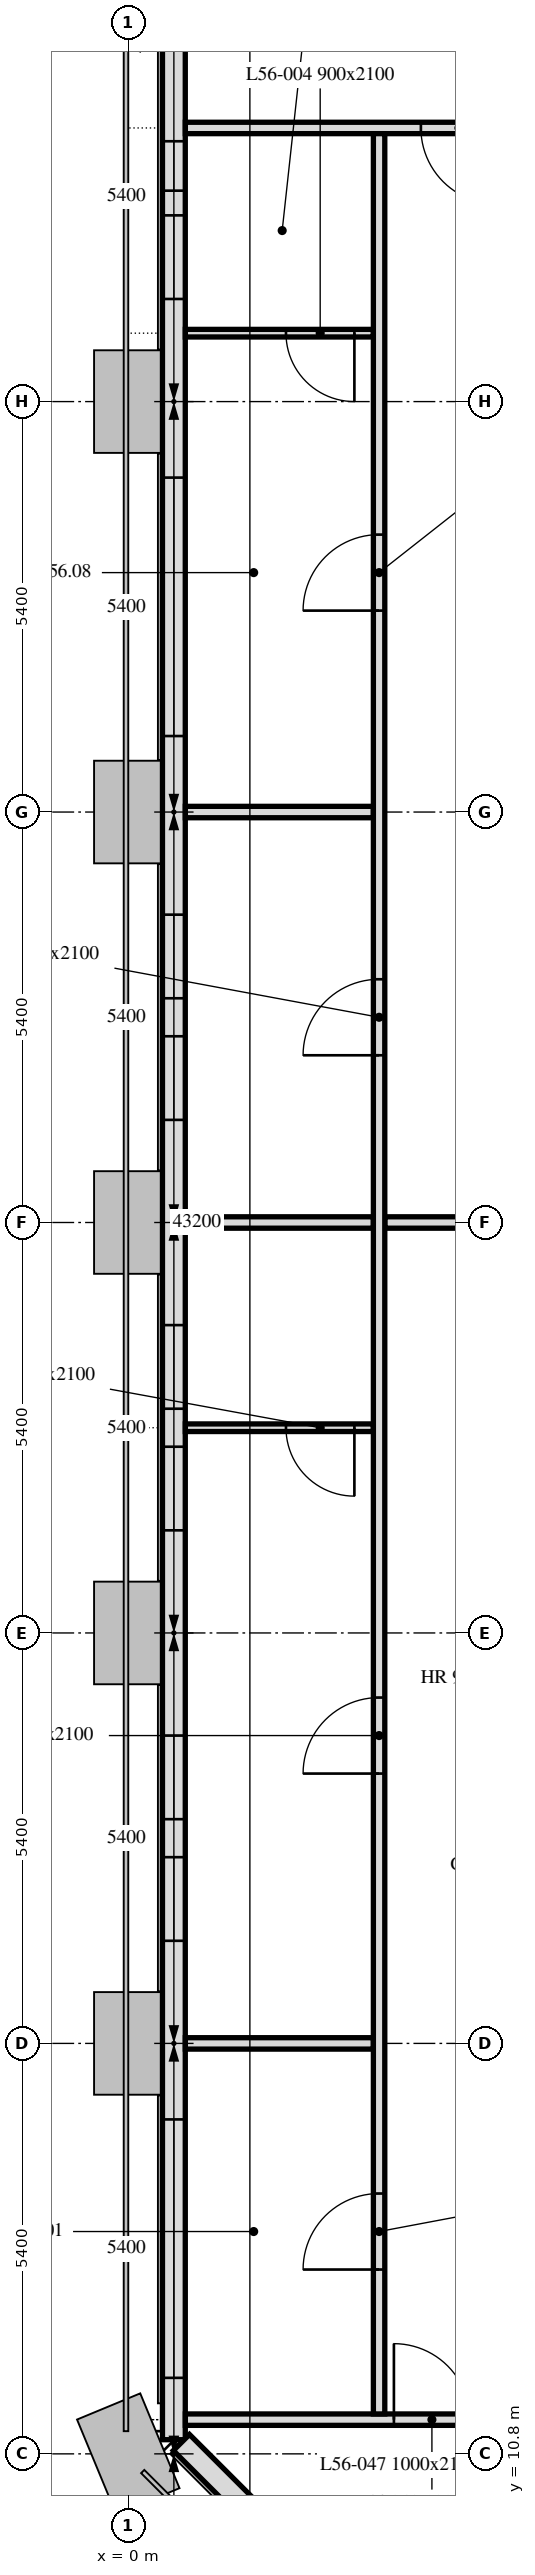
"""IFC4 building model, lengths in metres.
Left out: names, types, materials, properties, quantities, classifications, styles, units other than length and angle.
Written with IfcOpenShell. Run it as: python <this file> out.ifc"""

import sys

from ifc_helpers import new_model, si_unit, direction, frame, frame_2d, origin, place, context, subcontext, project, spatial, rectangle, extrude, element, fill, save


model = new_model("IFC4")
c1 = context("Model", 3, precision=1e-05, world=origin(), true_north=direction((0.0, 1.0)))
c2 = subcontext(c1, "Body", "Model", "MODEL_VIEW")
j1 = project(units=[si_unit("LENGTHUNIT", "METRE"), si_unit("PLANEANGLEUNIT", "RADIAN")], contexts=[c1])
p1 = place(None, origin())
s1 = spatial("IfcSite", under=j1, at=p1, CompositionType="ELEMENT")
p2 = place(p1, origin())
s2 = spatial("IfcBuilding", under=s1, at=p2, CompositionType="ELEMENT")
p3 = place(p2, frame((0.0, 0.0, 223.6)))
s3 = spatial("IfcBuildingStorey", under=s2, at=p3, CompositionType="ELEMENT", Elevation=223.6)
p4 = place(p3, frame((0.6, 43.014, 0.0), z_axis=(0.0, 0.0, 1.0), x_axis=(0.0, -1.0, 0.0)))
e1 = element("IfcWall", 1, at=p4, inside=s3, PredefinedType="SOLIDWALL", context=c2, shape_type="SweptSolid", body=[
    extrude(rectangle(XDim=32.027, YDim=0.3, at=frame_2d((16.014, 0.0))), origin(), (0.0, 0.0, 1.0), 3.0),
])
p5 = place(p4, frame((1.789, 0.0, 0.9)))
e2 = element("IfcOpeningElement", 2, at=p5, cuts=e1, PredefinedType="OPENING", context=c2, shape_type="SweptSolid", body=[
    extrude(rectangle(XDim=0.65, YDim=1.7, at=frame_2d((0.325, 0.85))), frame((0.0, 0.16, 0.0), z_axis=(0.0, -1.0, 0.0), x_axis=(1.0, 0.0, 0.0)), (0.0, 0.0, 1.0), 0.32),
])
p6 = place(p4, frame((2.764, 0.0, 0.9)))
e3 = element("IfcOpeningElement", 3, at=p6, cuts=e1, PredefinedType="OPENING", context=c2, shape_type="SweptSolid", body=[
    extrude(rectangle(XDim=1.1, YDim=1.7, at=frame_2d((0.55, 0.85))), frame((0.0, 0.16, 0.0), z_axis=(0.0, -1.0, 0.0), x_axis=(1.0, 0.0, 0.0)), (0.0, 0.0, 1.0), 0.32),
])
p7 = place(p4, frame((6.214, 0.0, 0.9)))
e4 = element("IfcOpeningElement", 4, at=p7, cuts=e1, PredefinedType="OPENING", context=c2, shape_type="SweptSolid", body=[
    extrude(rectangle(XDim=3.4, YDim=1.7, at=frame_2d((1.7, 0.85))), frame((0.0, 0.16, 0.0), z_axis=(0.0, -1.0, 0.0), x_axis=(1.0, 0.0, 0.0)), (0.0, 0.0, 1.0), 0.32),
])
p8 = place(p4, frame((11.964, 0.0, 0.9)))
e5 = element("IfcOpeningElement", 5, at=p8, cuts=e1, PredefinedType="OPENING", context=c2, shape_type="SweptSolid", body=[
    extrude(rectangle(XDim=1.1, YDim=1.7, at=frame_2d((0.55, 0.85))), frame((0.0, 0.16, 0.0), z_axis=(0.0, -1.0, 0.0), x_axis=(1.0, 0.0, 0.0)), (0.0, 0.0, 1.0), 0.32),
])
p9 = place(p4, frame((13.564, 0.0, 0.9)))
e6 = element("IfcOpeningElement", 6, at=p9, cuts=e1, PredefinedType="OPENING", context=c2, shape_type="SweptSolid", body=[
    extrude(rectangle(XDim=1.1, YDim=1.7, at=frame_2d((0.55, 0.85))), frame((0.0, 0.16, 0.0), z_axis=(0.0, -1.0, 0.0), x_axis=(1.0, 0.0, 0.0)), (0.0, 0.0, 1.0), 0.32),
])
p10 = place(p4, frame((17.364, 0.0, 0.9)))
e7 = element("IfcOpeningElement", 7, at=p10, cuts=e1, PredefinedType="OPENING", context=c2, shape_type="SweptSolid", body=[
    extrude(rectangle(XDim=1.1, YDim=1.7, at=frame_2d((0.55, 0.85))), frame((0.0, 0.16, 0.0), z_axis=(0.0, -1.0, 0.0), x_axis=(1.0, 0.0, 0.0)), (0.0, 0.0, 1.0), 0.32),
])
p11 = place(p4, frame((18.964, 0.0, 0.9)))
e8 = element("IfcOpeningElement", 8, at=p11, cuts=e1, PredefinedType="OPENING", context=c2, shape_type="SweptSolid", body=[
    extrude(rectangle(XDim=1.1, YDim=1.7, at=frame_2d((0.55, 0.85))), frame((0.0, 0.16, 0.0), z_axis=(0.0, -1.0, 0.0), x_axis=(1.0, 0.0, 0.0)), (0.0, 0.0, 1.0), 0.32),
])
p12 = place(p4, frame((22.764, 0.0, 0.9)))
e9 = element("IfcOpeningElement", 9, at=p12, cuts=e1, PredefinedType="OPENING", context=c2, shape_type="SweptSolid", body=[
    extrude(rectangle(XDim=1.1, YDim=1.7, at=frame_2d((0.55, 0.85))), frame((0.0, 0.16, 0.0), z_axis=(0.0, -1.0, 0.0), x_axis=(1.0, 0.0, 0.0)), (0.0, 0.0, 1.0), 0.32),
])
p13 = place(p4, frame((24.364, 0.0, 0.9)))
e10 = element("IfcOpeningElement", 10, at=p13, cuts=e1, PredefinedType="OPENING", context=c2, shape_type="SweptSolid", body=[
    extrude(rectangle(XDim=1.1, YDim=1.7, at=frame_2d((0.55, 0.85))), frame((0.0, 0.16, 0.0), z_axis=(0.0, -1.0, 0.0), x_axis=(1.0, 0.0, 0.0)), (0.0, 0.0, 1.0), 0.32),
])
p14 = place(p4, frame((27.814, 0.0, 0.9)))
e11 = element("IfcOpeningElement", 11, at=p14, cuts=e1, PredefinedType="OPENING", context=c2, shape_type="SweptSolid", body=[
    extrude(rectangle(XDim=3.4, YDim=1.7, at=frame_2d((1.7, 0.85))), frame((0.0, 0.16, 0.0), z_axis=(0.0, -1.0, 0.0), x_axis=(1.0, 0.0, 0.0)), (0.0, 0.0, 1.0), 0.32),
])
p15 = place(p3, frame((0.699, 10.949, 0.0), z_axis=(0.0, 0.0, 1.0), x_axis=(0.707106781187, -0.707106781187, 0.0)))
e12 = element("IfcWall", 12, at=p15, inside=s3, PredefinedType="SOLIDWALL", context=c2, shape_type="SweptSolid", body=[
    extrude(rectangle(XDim=6.86, YDim=0.3, at=frame_2d((3.43, 0.0))), origin(), (0.0, 0.0, 1.0), 3.0),
])
p16 = place(p15, frame((1.28, 0.0, 0.9)))
e13 = element("IfcOpeningElement", 13, at=p16, cuts=e12, PredefinedType="OPENING", context=c2, shape_type="SweptSolid", body=[
    extrude(rectangle(XDim=1.1, YDim=1.7, at=frame_2d((0.55, 0.85))), frame((0.0, 0.16, 0.0), z_axis=(0.0, -1.0, 0.0), x_axis=(1.0, 0.0, 0.0)), (0.0, 0.0, 1.0), 0.32),
])
p17 = place(p15, frame((4.48, 0.0, 0.9)))
e14 = element("IfcOpeningElement", 14, at=p17, cuts=e12, PredefinedType="OPENING", context=c2, shape_type="SweptSolid", body=[
    extrude(rectangle(XDim=1.1, YDim=1.7, at=frame_2d((0.55, 0.85))), frame((0.0, 0.16, 0.0), z_axis=(0.0, -1.0, 0.0), x_axis=(1.0, 0.0, 0.0)), (0.0, 0.0, 1.0), 0.32),
])
p18 = place(p3, frame((0.751, 32.4, 0.0), z_axis=(0.0, 0.0, 1.0), x_axis=(1.0, 0.0, 0.0)))
e15 = element("IfcWall", 15, at=p18, inside=s3, PredefinedType="PARTITIONING", context=c2, shape_type="SweptSolid", body=[
    extrude(rectangle(XDim=2.474, YDim=0.15, at=frame_2d((1.237, 0.0))), origin(), (0.0, 0.0, 1.0), 2.4),
])
p19 = place(p3, frame((3.225, 38.7, 0.0), z_axis=(0.0, 0.0, 1.0), x_axis=(-1.0, 0.0, 0.0)))
e16 = element("IfcWall", 16, at=p19, inside=s3, PredefinedType="PARTITIONING", context=c2, shape_type="SweptSolid", body=[
    extrude(rectangle(XDim=2.474, YDim=0.1, at=frame_2d((1.237, 0.0))), origin(), (0.0, 0.0, 1.0), 3.0),
])
p20 = place(p19, frame((0.25, 0.0, 0.0)))
e17 = element("IfcOpeningElement", 17, at=p20, cuts=e16, PredefinedType="OPENING", context=c2, shape_type="SweptSolid", body=[
    extrude(rectangle(XDim=0.9, YDim=2.1, at=frame_2d((0.45, 1.05))), frame((0.0, 0.05, 0.0), z_axis=(0.0, -1.0, 0.0), x_axis=(1.0, 0.0, 0.0)), (0.0, 0.0, 1.0), 0.1),
])
p21 = place(p3, frame((42.449, 41.4, 0.0), z_axis=(0.0, 0.0, 1.0), x_axis=(-1.0, 0.0, 0.0)))
e18 = element("IfcWall", 18, at=p21, inside=s3, PredefinedType="PARTITIONING", context=c2, shape_type="SweptSolid", body=[
    extrude(rectangle(XDim=41.698, YDim=0.15, at=frame_2d((20.849, 0.0))), origin(), (0.0, 0.0, 1.0), 2.4),
])
p22 = place(p21, frame((1.449, 0.0, 0.0)))
e19 = element("IfcOpeningElement", 19, at=p22, cuts=e18, PredefinedType="OPENING", context=c2, shape_type="SweptSolid", body=[
    extrude(rectangle(XDim=1.0, YDim=2.1, at=frame_2d((0.5, 1.05))), frame((0.0, 0.075, 0.0), z_axis=(0.0, -1.0, 0.0), x_axis=(1.0, 0.0, 0.0)), (0.0, 0.0, 1.0), 0.15),
])
p23 = place(p21, frame((29.249, 0.0, 0.0)))
e20 = element("IfcOpeningElement", 20, at=p23, cuts=e18, PredefinedType="OPENING", context=c2, shape_type="SweptSolid", body=[
    extrude(rectangle(XDim=1.0, YDim=2.1, at=frame_2d((0.5, 1.05))), frame((0.0, 0.075, 0.0), z_axis=(0.0, -1.0, 0.0), x_axis=(1.0, 0.0, 0.0)), (0.0, 0.0, 1.0), 0.15),
])
p24 = place(p21, frame((37.599, 0.0, 0.0)))
e21 = element("IfcOpeningElement", 21, at=p24, cuts=e18, PredefinedType="OPENING", context=c2, shape_type="SweptSolid", body=[
    extrude(rectangle(XDim=1.0, YDim=2.1, at=frame_2d((0.5, 1.05))), frame((0.0, 0.075, 0.0), z_axis=(0.0, -1.0, 0.0), x_axis=(1.0, 0.0, 0.0)), (0.0, 0.0, 1.0), 0.15),
])
p25 = place(p21, frame((17.649, 0.0, 0.0)))
e22 = element("IfcOpeningElement", 22, at=p25, cuts=e18, PredefinedType="OPENING", context=c2, shape_type="SweptSolid", body=[
    extrude(rectangle(XDim=1.0, YDim=2.1, at=frame_2d((0.5, 1.05))), frame((0.0, 0.075, 0.0), z_axis=(0.0, -1.0, 0.0), x_axis=(1.0, 0.0, 0.0)), (0.0, 0.0, 1.0), 0.15),
])
p26 = place(p3, frame((0.751, 27.0, 0.0), z_axis=(0.0, 0.0, 1.0), x_axis=(1.0, 0.0, 0.0)))
e23 = element("IfcWall", 23, at=p26, inside=s3, PredefinedType="PARTITIONING", context=c2, shape_type="SweptSolid", body=[
    extrude(rectangle(XDim=2.474, YDim=0.15, at=frame_2d((1.237, 0.0))), origin(), (0.0, 0.0, 1.0), 2.4),
])
p27 = place(p3, frame((3.375, 27.0, 0.0), z_axis=(0.0, 0.0, 1.0), x_axis=(1.0, 0.0, 0.0)))
e24 = element("IfcWall", 24, at=p27, inside=s3, PredefinedType="PARTITIONING", context=c2, shape_type="SweptSolid", body=[
    extrude(rectangle(XDim=2.025, YDim=0.15, at=frame_2d((1.012, 0.0))), origin(), (0.0, 0.0, 1.0), 2.4),
])
p28 = place(p3, frame((3.225, 16.2, 0.0), z_axis=(0.0, 0.0, 1.0), x_axis=(-1.0, 0.0, 0.0)))
e25 = element("IfcWall", 25, at=p28, inside=s3, PredefinedType="PARTITIONING", context=c2, shape_type="SweptSolid", body=[
    extrude(rectangle(XDim=2.474, YDim=0.15, at=frame_2d((1.237, 0.0))), origin(), (0.0, 0.0, 1.0), 2.4),
])
p29 = place(p3, frame((0.751, 11.25, 0.0), z_axis=(0.0, 0.0, 1.0), x_axis=(1.0, 0.0, 0.0)))
e26 = element("IfcWall", 26, at=p29, inside=s3, PredefinedType="PARTITIONING", context=c2, shape_type="SweptSolid", body=[
    extrude(rectangle(XDim=41.698, YDim=0.15, at=frame_2d((20.849, 0.0))), origin(), (0.0, 0.0, 1.0), 3.0),
])
p30 = place(p29, frame((39.249, 0.0, 0.0)))
e27 = element("IfcOpeningElement", 27, at=p30, cuts=e26, PredefinedType="OPENING", context=c2, shape_type="SweptSolid", body=[
    extrude(rectangle(XDim=1.0, YDim=2.1, at=frame_2d((0.5, 1.05))), frame((0.0, 0.075, 0.0), z_axis=(0.0, -1.0, 0.0), x_axis=(1.0, 0.0, 0.0)), (0.0, 0.0, 1.0), 0.15),
])
p31 = place(p29, frame((27.649, 0.0, 0.0)))
e28 = element("IfcOpeningElement", 28, at=p31, cuts=e26, PredefinedType="OPENING", context=c2, shape_type="SweptSolid", body=[
    extrude(rectangle(XDim=1.0, YDim=2.1, at=frame_2d((0.5, 1.05))), frame((0.0, 0.075, 0.0), z_axis=(0.0, -1.0, 0.0), x_axis=(1.0, 0.0, 0.0)), (0.0, 0.0, 1.0), 0.15),
])
p32 = place(p29, frame((23.049, 0.0, 0.0)))
e29 = element("IfcOpeningElement", 29, at=p32, cuts=e26, PredefinedType="OPENING", context=c2, shape_type="SweptSolid", body=[
    extrude(rectangle(XDim=1.0, YDim=2.1, at=frame_2d((0.5, 1.05))), frame((0.0, 0.075, 0.0), z_axis=(0.0, -1.0, 0.0), x_axis=(1.0, 0.0, 0.0)), (0.0, 0.0, 1.0), 0.15),
])
p33 = place(p29, frame((11.449, 0.0, 0.0)))
e30 = element("IfcOpeningElement", 30, at=p33, cuts=e26, PredefinedType="OPENING", context=c2, shape_type="SweptSolid", body=[
    extrude(rectangle(XDim=1.0, YDim=2.1, at=frame_2d((0.5, 1.05))), frame((0.0, 0.075, 0.0), z_axis=(0.0, -1.0, 0.0), x_axis=(1.0, 0.0, 0.0)), (0.0, 0.0, 1.0), 0.15),
])
p34 = place(p29, frame((2.744, 0.0, 0.0)))
e31 = element("IfcOpeningElement", 31, at=p34, cuts=e26, PredefinedType="OPENING", context=c2, shape_type="SweptSolid", body=[
    extrude(rectangle(XDim=1.0, YDim=2.1, at=frame_2d((0.5, 1.05))), frame((0.0, 0.075, 0.0), z_axis=(0.0, -1.0, 0.0), x_axis=(1.0, 0.0, 0.0)), (0.0, 0.0, 1.0), 0.15),
])
p35 = place(p3, frame((3.225, 24.3, 0.0), z_axis=(0.0, 0.0, 1.0), x_axis=(-1.0, 0.0, 0.0)))
e32 = element("IfcWall", 32, at=p35, inside=s3, PredefinedType="PARTITIONING", context=c2, shape_type="SweptSolid", body=[
    extrude(rectangle(XDim=2.474, YDim=0.1, at=frame_2d((1.237, 0.0))), origin(), (0.0, 0.0, 1.0), 3.0),
])
p36 = place(p35, frame((0.25, 0.0, 0.0)))
e33 = element("IfcOpeningElement", 33, at=p36, cuts=e32, PredefinedType="OPENING", context=c2, shape_type="SweptSolid", body=[
    extrude(rectangle(XDim=0.9, YDim=2.1, at=frame_2d((0.45, 1.05))), frame((0.0, 0.05, 0.0), z_axis=(0.0, -1.0, 0.0), x_axis=(1.0, 0.0, 0.0)), (0.0, 0.0, 1.0), 0.1),
])
p37 = place(p3, frame((3.3, 11.325, 0.0), z_axis=(0.0, 0.0, 1.0), x_axis=(0.0, 1.0, 0.0)))
e34 = element("IfcWall", 34, at=p37, inside=s3, PredefinedType="PARTITIONING", context=c2, shape_type="SweptSolid", body=[
    extrude(rectangle(XDim=30.0, YDim=0.15, at=frame_2d((15.0, 0.0))), origin(), (0.0, 0.0, 1.0), 2.4),
])
p38 = place(p37, frame((17.875, 0.0, 0.0)))
e35 = element("IfcOpeningElement", 35, at=p38, cuts=e34, PredefinedType="OPENING", context=c2, shape_type="SweptSolid", body=[
    extrude(rectangle(XDim=1.0, YDim=2.1, at=frame_2d((0.5, 1.05))), frame((0.0, 0.075, 0.0), z_axis=(0.0, -1.0, 0.0), x_axis=(1.0, 0.0, 0.0)), (0.0, 0.0, 1.0), 0.15),
])
p39 = place(p37, frame((1.9, 0.0, 0.0)))
e36 = element("IfcOpeningElement", 36, at=p39, cuts=e34, PredefinedType="OPENING", context=c2, shape_type="SweptSolid", body=[
    extrude(rectangle(XDim=1.0, YDim=2.1, at=frame_2d((0.5, 1.05))), frame((0.0, 0.075, 0.0), z_axis=(0.0, -1.0, 0.0), x_axis=(1.0, 0.0, 0.0)), (0.0, 0.0, 1.0), 0.15),
])
p40 = place(p37, frame((23.725, 0.0, 0.0)))
e37 = element("IfcOpeningElement", 37, at=p40, cuts=e34, PredefinedType="OPENING", context=c2, shape_type="SweptSolid", body=[
    extrude(rectangle(XDim=1.0, YDim=2.1, at=frame_2d((0.5, 1.05))), frame((0.0, 0.075, 0.0), z_axis=(0.0, -1.0, 0.0), x_axis=(1.0, 0.0, 0.0)), (0.0, 0.0, 1.0), 0.15),
])
p41 = place(p37, frame((8.425, 0.0, 0.0)))
e38 = element("IfcOpeningElement", 38, at=p41, cuts=e34, PredefinedType="OPENING", context=c2, shape_type="SweptSolid", body=[
    extrude(rectangle(XDim=1.0, YDim=2.1, at=frame_2d((0.5, 1.05))), frame((0.0, 0.075, 0.0), z_axis=(0.0, -1.0, 0.0), x_axis=(1.0, 0.0, 0.0)), (0.0, 0.0, 1.0), 0.15),
])
p42 = place(p5, origin())
e39 = element("IfcWindow", 39, at=p42, inside=s3, PartitioningType="SINGLE_PANEL", PredefinedType="WINDOW", context=c2, shape_type="SweptSolid", body=[
    extrude(rectangle(XDim=0.65, YDim=1.7, at=frame_2d((0.325, 0.85))), frame((0.0, 0.03, 0.0), z_axis=(0.0, -1.0, 0.0), x_axis=(1.0, 0.0, 0.0)), (0.0, 0.0, 1.0), 0.06),
])
fill(e2, e39)
p43 = place(p6, origin())
e40 = element("IfcWindow", 40, at=p43, inside=s3, PartitioningType="SINGLE_PANEL", PredefinedType="WINDOW", context=c2, shape_type="SweptSolid", body=[
    extrude(rectangle(XDim=1.1, YDim=1.7, at=frame_2d((0.55, 0.85))), frame((0.0, 0.03, 0.0), z_axis=(0.0, -1.0, 0.0), x_axis=(1.0, 0.0, 0.0)), (0.0, 0.0, 1.0), 0.06),
])
fill(e3, e40)
p44 = place(p7, origin())
e41 = element("IfcWindow", 41, at=p44, inside=s3, PartitioningType="SINGLE_PANEL", PredefinedType="WINDOW", context=c2, shape_type="SweptSolid", body=[
    extrude(rectangle(XDim=3.4, YDim=1.7, at=frame_2d((1.7, 0.85))), frame((0.0, 0.03, 0.0), z_axis=(0.0, -1.0, 0.0), x_axis=(1.0, 0.0, 0.0)), (0.0, 0.0, 1.0), 0.06),
])
fill(e4, e41)
p45 = place(p8, origin())
e42 = element("IfcWindow", 42, at=p45, inside=s3, PartitioningType="SINGLE_PANEL", PredefinedType="WINDOW", context=c2, shape_type="SweptSolid", body=[
    extrude(rectangle(XDim=1.1, YDim=1.7, at=frame_2d((0.55, 0.85))), frame((0.0, 0.03, 0.0), z_axis=(0.0, -1.0, 0.0), x_axis=(1.0, 0.0, 0.0)), (0.0, 0.0, 1.0), 0.06),
])
fill(e5, e42)
p46 = place(p9, origin())
e43 = element("IfcWindow", 43, at=p46, inside=s3, PartitioningType="SINGLE_PANEL", PredefinedType="WINDOW", context=c2, shape_type="SweptSolid", body=[
    extrude(rectangle(XDim=1.1, YDim=1.7, at=frame_2d((0.55, 0.85))), frame((0.0, 0.03, 0.0), z_axis=(0.0, -1.0, 0.0), x_axis=(1.0, 0.0, 0.0)), (0.0, 0.0, 1.0), 0.06),
])
fill(e6, e43)
p47 = place(p10, origin())
e44 = element("IfcWindow", 44, at=p47, inside=s3, PartitioningType="SINGLE_PANEL", PredefinedType="WINDOW", context=c2, shape_type="SweptSolid", body=[
    extrude(rectangle(XDim=1.1, YDim=1.7, at=frame_2d((0.55, 0.85))), frame((0.0, 0.03, 0.0), z_axis=(0.0, -1.0, 0.0), x_axis=(1.0, 0.0, 0.0)), (0.0, 0.0, 1.0), 0.06),
])
fill(e7, e44)
p48 = place(p11, origin())
e45 = element("IfcWindow", 45, at=p48, inside=s3, PartitioningType="SINGLE_PANEL", PredefinedType="WINDOW", context=c2, shape_type="SweptSolid", body=[
    extrude(rectangle(XDim=1.1, YDim=1.7, at=frame_2d((0.55, 0.85))), frame((0.0, 0.03, 0.0), z_axis=(0.0, -1.0, 0.0), x_axis=(1.0, 0.0, 0.0)), (0.0, 0.0, 1.0), 0.06),
])
fill(e8, e45)
p49 = place(p12, origin())
e46 = element("IfcWindow", 46, at=p49, inside=s3, PartitioningType="SINGLE_PANEL", PredefinedType="WINDOW", context=c2, shape_type="SweptSolid", body=[
    extrude(rectangle(XDim=1.1, YDim=1.7, at=frame_2d((0.55, 0.85))), frame((0.0, 0.03, 0.0), z_axis=(0.0, -1.0, 0.0), x_axis=(1.0, 0.0, 0.0)), (0.0, 0.0, 1.0), 0.06),
])
fill(e9, e46)
p50 = place(p13, origin())
e47 = element("IfcWindow", 47, at=p50, inside=s3, PartitioningType="SINGLE_PANEL", PredefinedType="WINDOW", context=c2, shape_type="SweptSolid", body=[
    extrude(rectangle(XDim=1.1, YDim=1.7, at=frame_2d((0.55, 0.85))), frame((0.0, 0.03, 0.0), z_axis=(0.0, -1.0, 0.0), x_axis=(1.0, 0.0, 0.0)), (0.0, 0.0, 1.0), 0.06),
])
fill(e10, e47)
p51 = place(p14, origin())
e48 = element("IfcWindow", 48, at=p51, inside=s3, PartitioningType="SINGLE_PANEL", PredefinedType="WINDOW", context=c2, shape_type="SweptSolid", body=[
    extrude(rectangle(XDim=3.4, YDim=1.7, at=frame_2d((1.7, 0.85))), frame((0.0, 0.03, 0.0), z_axis=(0.0, -1.0, 0.0), x_axis=(1.0, 0.0, 0.0)), (0.0, 0.0, 1.0), 0.06),
])
fill(e11, e48)
p52 = place(p20, origin())
e49 = element("IfcDoor", 49, at=p52, inside=s3, OperationType="SINGLE_SWING_LEFT", PredefinedType="DOOR", context=c2, shape_type="SweptSolid", body=[
    extrude(rectangle(XDim=0.9, YDim=2.1, at=frame_2d((0.45, 1.05))), frame((0.0, 0.025, 0.0), z_axis=(0.0, -1.0, 0.0), x_axis=(1.0, 0.0, 0.0)), (0.0, 0.0, 1.0), 0.05),
])
fill(e17, e49)
p53 = place(p38, origin())
e50 = element("IfcDoor", 50, at=p53, inside=s3, OperationType="SINGLE_SWING_RIGHT", PredefinedType="DOOR", context=c2, shape_type="SweptSolid", body=[
    extrude(rectangle(XDim=1.0, YDim=2.1, at=frame_2d((0.5, 1.05))), frame((0.0, 0.025, 0.0), z_axis=(0.0, -1.0, 0.0), x_axis=(1.0, 0.0, 0.0)), (0.0, 0.0, 1.0), 0.05),
])
fill(e35, e50)
p54 = place(p39, origin())
e51 = element("IfcDoor", 51, at=p54, inside=s3, OperationType="SINGLE_SWING_LEFT", PredefinedType="DOOR", context=c2, shape_type="SweptSolid", body=[
    extrude(rectangle(XDim=1.0, YDim=2.1, at=frame_2d((0.5, 1.05))), frame((0.0, 0.025, 0.0), z_axis=(0.0, -1.0, 0.0), x_axis=(1.0, 0.0, 0.0)), (0.0, 0.0, 1.0), 0.05),
])
fill(e36, e51)
p55 = place(p36, origin())
e52 = element("IfcDoor", 52, at=p55, inside=s3, OperationType="SINGLE_SWING_RIGHT", PredefinedType="DOOR", context=c2, shape_type="SweptSolid", body=[
    extrude(rectangle(XDim=0.9, YDim=2.1, at=frame_2d((0.45, 1.05))), frame((0.0, 0.025, 0.0), z_axis=(0.0, -1.0, 0.0), x_axis=(1.0, 0.0, 0.0)), (0.0, 0.0, 1.0), 0.05),
])
fill(e33, e52)
p56 = place(p40, origin())
e53 = element("IfcDoor", 53, at=p56, inside=s3, OperationType="SINGLE_SWING_LEFT", PredefinedType="DOOR", context=c2, shape_type="SweptSolid", body=[
    extrude(rectangle(XDim=1.0, YDim=2.1, at=frame_2d((0.5, 1.05))), frame((0.0, 0.025, 0.0), z_axis=(0.0, -1.0, 0.0), x_axis=(1.0, 0.0, 0.0)), (0.0, 0.0, 1.0), 0.05),
])
fill(e37, e53)
p57 = place(p24, origin())
e54 = element("IfcDoor", 54, at=p57, inside=s3, OperationType="SINGLE_SWING_LEFT", PredefinedType="DOOR", context=c2, shape_type="SweptSolid", body=[
    extrude(rectangle(XDim=1.0, YDim=2.1, at=frame_2d((0.5, 1.05))), frame((0.0, 0.025, 0.0), z_axis=(0.0, -1.0, 0.0), x_axis=(1.0, 0.0, 0.0)), (0.0, 0.0, 1.0), 0.05),
])
fill(e21, e54)
p58 = place(p34, origin())
e55 = element("IfcDoor", 55, at=p58, inside=s3, OperationType="SINGLE_SWING_LEFT", PredefinedType="DOOR", context=c2, shape_type="SweptSolid", body=[
    extrude(rectangle(XDim=1.0, YDim=2.1, at=frame_2d((0.5, 1.05))), frame((0.0, 0.025, 0.0), z_axis=(0.0, -1.0, 0.0), x_axis=(1.0, 0.0, 0.0)), (0.0, 0.0, 1.0), 0.05),
])
fill(e31, e55)
p59 = place(p41, origin())
e56 = element("IfcDoor", 56, at=p59, inside=s3, OperationType="SINGLE_SWING_LEFT", PredefinedType="DOOR", context=c2, shape_type="SweptSolid", body=[
    extrude(rectangle(XDim=1.0, YDim=2.1, at=frame_2d((0.5, 1.05))), frame((0.0, 0.025, 0.0), z_axis=(0.0, -1.0, 0.0), x_axis=(1.0, 0.0, 0.0)), (0.0, 0.0, 1.0), 0.05),
])
fill(e38, e56)
save(model, sys.argv[1])
